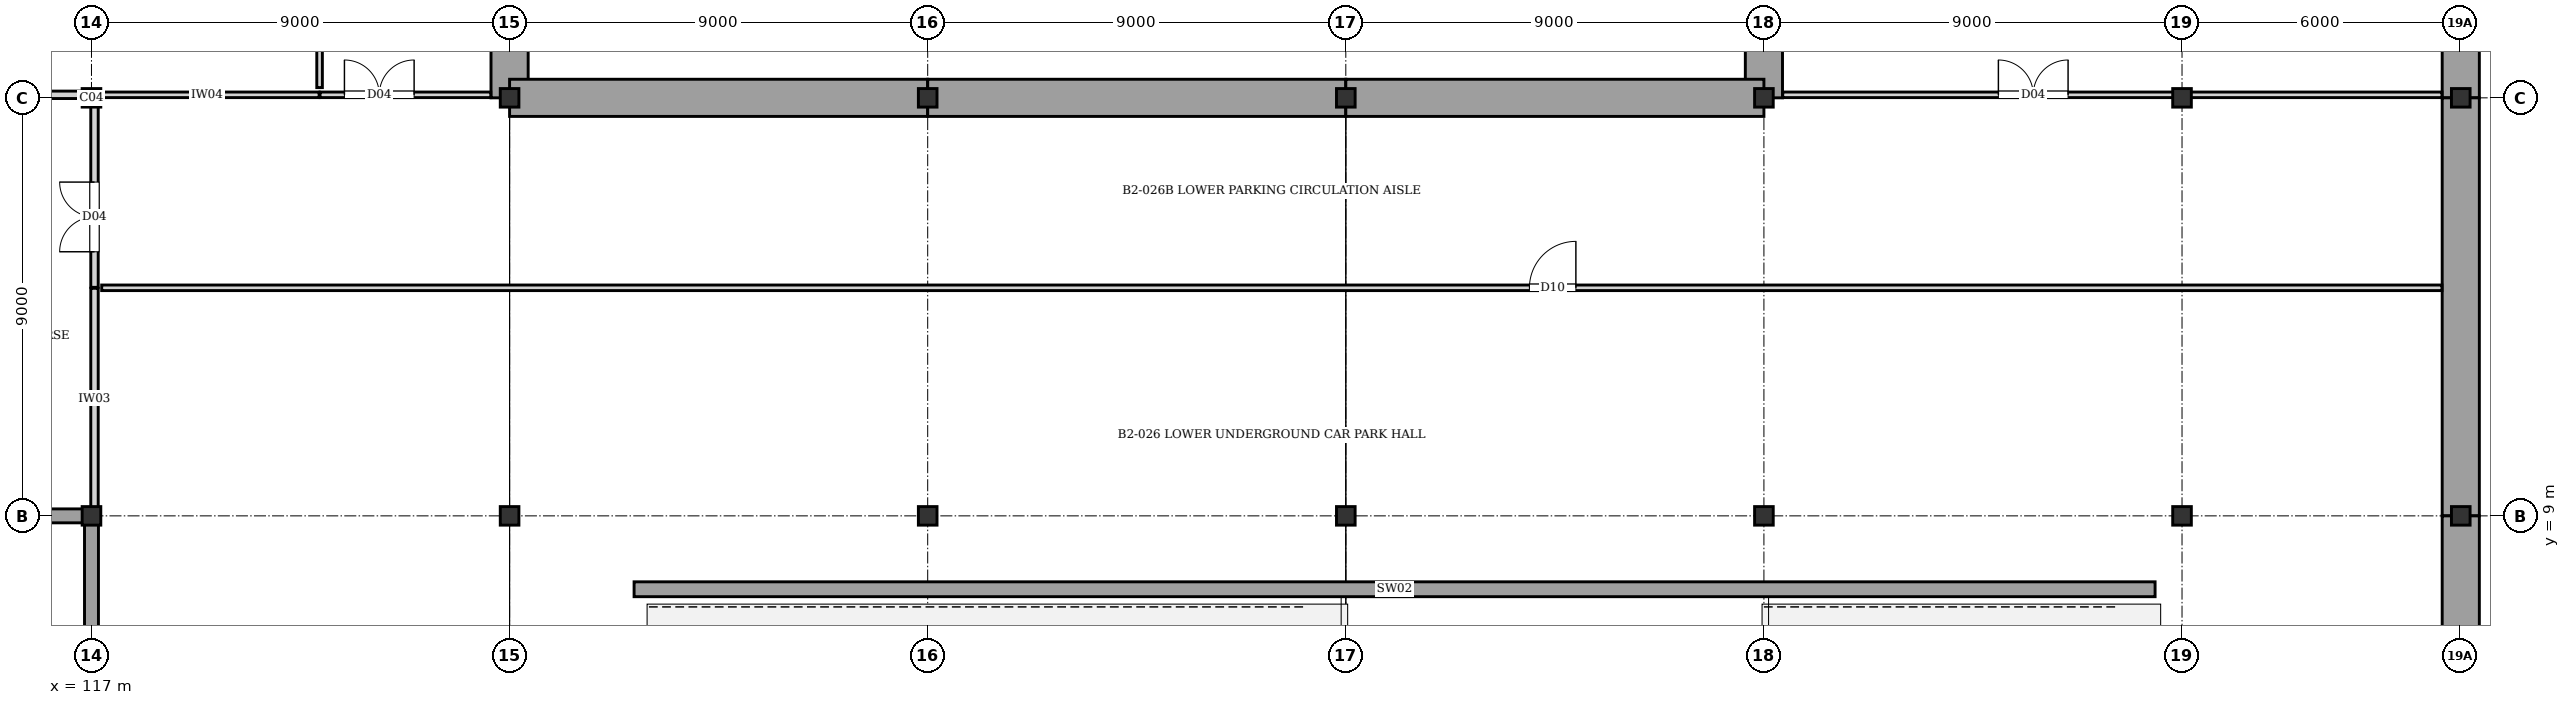
"""IFC4 building model, lengths in metres.
Left out: names, types, materials, properties, quantities, classifications, styles, units other than length and angle.
Written with IfcOpenShell. Run it as: python <this file> out.ifc"""

import sys

from ifc_helpers import new_model, si_unit, direction, frame, frame_2d, origin, origin_2d, place, context, subcontext, project, spatial, rectangle, i_section, extrude, element, fill, save


model = new_model("IFC4")
c1 = context("Model", 3, precision=1e-05, world=origin(), true_north=direction((0.0, 1.0)))
c2 = subcontext(c1, "Body", "Model", "MODEL_VIEW")
j1 = project(units=[si_unit("LENGTHUNIT", "METRE"), si_unit("PLANEANGLEUNIT", "RADIAN")], contexts=[c1])
p1 = place(None, origin())
s1 = spatial("IfcSite", under=j1, at=p1, CompositionType="ELEMENT")
p2 = place(p1, origin())
s2 = spatial("IfcBuilding", under=s1, at=p2, CompositionType="ELEMENT")
p3 = place(p2, frame((0.0, 0.0, -8.96)))
s3 = spatial("IfcBuildingStorey", under=s2, at=p3, CompositionType="ELEMENT", Elevation=-8.96)
for number, where, z_axis, x_axis in (
    (1, (117.0, 9.0, 0.0), (0.0, 0.0, 1.0), (1.0, 0.0, 0.0)),
    (2, (117.0, 18.0, 0.0), (0.0, 0.0, 1.0), (1.0, 0.0, 0.0)),
    (3, (126.0, 9.0, 0.0), (0.0, 0.0, 1.0), (1.0, 0.0, 0.0)),
    (4, (126.0, 18.0, 0.0), (0.0, 0.0, 1.0), (1.0, 0.0, 0.0)),
    (5, (135.0, 9.0, 0.0), (0.0, 0.0, 1.0), (1.0, 0.0, 0.0)),
    (6, (135.0, 18.0, 0.0), (0.0, 0.0, 1.0), (1.0, 0.0, 0.0)),
    (7, (144.0, 9.0, 0.0), (0.0, 0.0, 1.0), (1.0, 0.0, 0.0)),
    (8, (144.0, 18.0, 0.0), (0.0, 0.0, 1.0), (1.0, 0.0, 0.0)),
    (9, (153.0, 9.0, 0.0), (0.0, 0.0, 1.0), (1.0, 0.0, 0.0)),
    (10, (153.0, 18.0, 0.0), (0.0, 0.0, 1.0), (1.0, 0.0, 0.0)),
    (11, (162.0, 9.0, 0.0), (0.0, 0.0, 1.0), (1.0, 0.0, 0.0)),
    (12, (162.0, 18.0, 0.0), (0.0, 0.0, 1.0), (1.0, 0.0, 0.0)),
    (13, (168.0, 9.0, 0.0), (0.0, 0.0, 1.0), (1.0, 0.0, 0.0)),
    (14, (168.0, 18.0, 0.0), (0.0, 0.0, 1.0), (1.0, 0.0, 0.0)),
):
    element("IfcColumn", number, at=place(p3, frame(where, z_axis=z_axis, x_axis=x_axis)), inside=s3, PredefinedType="COLUMN", context=c2, shape_type="SweptSolid", body=[
        extrude(i_section(OverallWidth=0.401, OverallDepth=0.399, WebThickness=0.019, FlangeThickness=0.03, at=origin_2d()), origin(), (0.0, 0.0, 1.0), 4.48),
    ])
for number, where, z_axis, x_axis in (
    (15, (168.0, 27.0, 0.0), (0.0, 0.0, 1.0), (0.0, -1.0, 0.0)),
    (16, (168.0, 18.0, 0.0), (0.0, 0.0, 1.0), (0.0, -1.0, 0.0)),
    (17, (168.0, 9.0, 0.0), (0.0, 0.0, 1.0), (0.0, -1.0, 0.0)),
    (18, (153.0, 18.0, 0.0), (0.0, 0.0, 1.0), (0.0, 1.0, 0.0)),
    (19, (126.0, 27.0, 0.0), (0.0, 0.0, 1.0), (0.0, -1.0, 0.0)),
    (20, (126.0, 18.0, 0.0), (0.0, 0.0, 1.0), (1.0, 0.0, 0.0)),
    (21, (135.0, 18.0, 0.0), (0.0, 0.0, 1.0), (1.0, 0.0, 0.0)),
    (22, (144.0, 18.0, 0.0), (0.0, 0.0, 1.0), (1.0, 0.0, 0.0)),
):
    element("IfcWall", number, at=place(p3, frame(where, z_axis=z_axis, x_axis=x_axis)), inside=s3, PredefinedType="USERDEFINED", context=c2, shape_type="SweptSolid", body=[
        extrude(rectangle(XDim=9.0, YDim=0.8, at=frame_2d((4.5, 0.0))), origin(), (0.0, 0.0, 1.0), 4.08),
    ])
p4 = place(p3, frame((117.0, 0.0, 0.0), z_axis=(0.0, 0.0, 1.0), x_axis=(0.0, 1.0, 0.0)))
e23 = element("IfcWall", 23, at=p4, inside=s3, PredefinedType="SHEAR", context=c2, shape_type="SweptSolid", body=[
    extrude(rectangle(XDim=9.0, YDim=0.3, at=frame_2d((4.5, 0.0))), origin(), (0.0, 0.0, 1.0), 4.08),
])
p5 = place(p3, frame((108.0, 9.0, 0.0), z_axis=(0.0, 0.0, 1.0), x_axis=(1.0, 0.0, 0.0)))
e24 = element("IfcWall", 24, at=p5, inside=s3, PredefinedType="SHEAR", context=c2, shape_type="SweptSolid", body=[
    extrude(rectangle(XDim=9.0, YDim=0.3, at=frame_2d((4.5, 0.0))), origin(), (0.0, 0.0, 1.0), 4.08),
])
p6 = place(p5, frame((6.05, 0.0, 0.0)))
e25 = element("IfcOpeningElement", 25, at=p6, cuts=e24, PredefinedType="OPENING", context=c2, shape_type="SweptSolid", body=[
    extrude(rectangle(XDim=1.4, YDim=2.02, at=frame_2d((0.7, 1.01))), frame((0.0, 0.16, 0.0), z_axis=(0.0, -1.0, 0.0), x_axis=(1.0, 0.0, 0.0)), (0.0, 0.0, 1.0), 0.32),
])
p7 = place(p3, frame((128.68, 7.42, 0.0), z_axis=(0.0, 0.0, 1.0), x_axis=(1.0, 0.0, 0.0)))
e26 = element("IfcWall", 26, at=p7, inside=s3, PredefinedType="SHEAR", context=c2, shape_type="SweptSolid", body=[
    extrude(rectangle(XDim=32.74, YDim=0.32, at=frame_2d((16.37, 0.0))), origin(), (0.0, 0.0, 1.0), 4.08),
])
p8 = place(p3, frame((117.065, 9.155, 0.0), z_axis=(0.0, 0.0, 1.0), x_axis=(0.0, 1.0, 0.0)))
e27 = element("IfcWall", 27, at=p8, inside=s3, PredefinedType="PARTITIONING", context=c2, shape_type="SweptSolid", body=[
    extrude(rectangle(XDim=4.745, YDim=0.16, at=frame_2d((2.373, 0.0))), origin(), (0.0, 0.0, 1.0), 3.18),
])
p9 = place(p3, frame((108.405, 18.065, 0.0), z_axis=(0.0, 0.0, 1.0), x_axis=(1.0, 0.0, 0.0)))
e28 = element("IfcWall", 28, at=p9, inside=s3, PredefinedType="PARTITIONING", context=c2, shape_type="SweptSolid", body=[
    extrude(rectangle(XDim=8.655, YDim=0.16, at=frame_2d((4.328, 0.0))), origin(), (0.0, 0.0, 1.0), 3.18),
])
p10 = place(p3, frame((117.07, 18.065, 0.0), z_axis=(0.0, 0.0, 1.0), x_axis=(1.0, 0.0, 0.0)))
e29 = element("IfcWall", 29, at=p10, inside=s3, PredefinedType="PARTITIONING", context=c2, shape_type="SweptSolid", body=[
    extrude(rectangle(XDim=4.83, YDim=0.12, at=frame_2d((2.415, 0.0))), origin(), (0.0, 0.0, 1.0), 3.18),
])
p11 = place(p3, frame((117.065, 13.92, 0.0), z_axis=(0.0, 0.0, 1.0), x_axis=(0.0, 1.0, 0.0)))
e30 = element("IfcWall", 30, at=p11, inside=s3, PredefinedType="PARTITIONING", context=c2, shape_type="SweptSolid", body=[
    extrude(rectangle(XDim=3.99, YDim=0.16, at=frame_2d((1.995, 0.0))), origin(), (0.0, 0.0, 1.0), 3.18),
])
p12 = place(p11, frame((0.766, 0.0, 0.0)))
e31 = element("IfcOpeningElement", 31, at=p12, cuts=e30, PredefinedType="OPENING", context=c2, shape_type="SweptSolid", body=[
    extrude(rectangle(XDim=1.5, YDim=2.1, at=frame_2d((0.75, 1.05))), frame((0.0, 0.09, 0.0), z_axis=(0.0, -1.0, 0.0), x_axis=(1.0, 0.0, 0.0)), (0.0, 0.0, 1.0), 0.18),
])
p13 = place(p3, frame((117.22, 13.91, 0.0), z_axis=(0.0, 0.0, 1.0), x_axis=(1.0, 0.0, 0.0)))
e32 = element("IfcWall", 32, at=p13, inside=s3, PredefinedType="PARTITIONING", context=c2, shape_type="SweptSolid", body=[
    extrude(rectangle(XDim=50.375, YDim=0.12, at=frame_2d((25.188, 0.0))), origin(), (0.0, 0.0, 1.0), 4.08),
])
p14 = place(p13, frame((30.732, 0.0, 0.0)))
e33 = element("IfcOpeningElement", 33, at=p14, cuts=e32, PredefinedType="OPENING", context=c2, shape_type="SweptSolid", body=[
    extrude(rectangle(XDim=1.0, YDim=2.1, at=frame_2d((0.5, 1.05))), frame((0.0, 0.07, 0.0), z_axis=(0.0, -1.0, 0.0), x_axis=(1.0, 0.0, 0.0)), (0.0, 0.0, 1.0), 0.14),
])
p15 = place(p3, frame((121.92, 18.065, 0.0), z_axis=(0.0, 0.0, 1.0), x_axis=(1.0, 0.0, 0.0)))
e34 = element("IfcWall", 34, at=p15, inside=s3, PredefinedType="PARTITIONING", context=c2, shape_type="SweptSolid", body=[
    extrude(rectangle(XDim=3.675, YDim=0.12, at=frame_2d((1.837, 0.0))), origin(), (0.0, 0.0, 1.0), 3.18),
])
p16 = place(p15, frame((0.525, 0.0, 0.0)))
e35 = element("IfcOpeningElement", 35, at=p16, cuts=e34, PredefinedType="OPENING", context=c2, shape_type="SweptSolid", body=[
    extrude(rectangle(XDim=1.5, YDim=2.1, at=frame_2d((0.75, 1.05))), frame((0.0, 0.07, 0.0), z_axis=(0.0, -1.0, 0.0), x_axis=(1.0, 0.0, 0.0)), (0.0, 0.0, 1.0), 0.14),
])
p17 = place(p3, frame((153.405, 18.065, 0.0), z_axis=(0.0, 0.0, 1.0), x_axis=(1.0, 0.0, 0.0)))
e36 = element("IfcWall", 36, at=p17, inside=s3, PredefinedType="PARTITIONING", context=c2, shape_type="SweptSolid", body=[
    extrude(rectangle(XDim=8.615, YDim=0.12, at=frame_2d((4.308, 0.0))), origin(), (0.0, 0.0, 1.0), 3.18),
])
p18 = place(p17, frame((4.642, 0.0, 0.0)))
e37 = element("IfcOpeningElement", 37, at=p18, cuts=e36, PredefinedType="OPENING", context=c2, shape_type="SweptSolid", body=[
    extrude(rectangle(XDim=1.5, YDim=2.1, at=frame_2d((0.75, 1.05))), frame((0.0, 0.07, 0.0), z_axis=(0.0, -1.0, 0.0), x_axis=(1.0, 0.0, 0.0)), (0.0, 0.0, 1.0), 0.14),
])
p19 = place(p3, frame((121.91, 18.22, 0.0), z_axis=(0.0, 0.0, 1.0), x_axis=(0.0, 1.0, 0.0)))
e38 = element("IfcWall", 38, at=p19, inside=s3, PredefinedType="PARTITIONING", context=c2, shape_type="SweptSolid", body=[
    extrude(rectangle(XDim=26.51, YDim=0.12, at=frame_2d((13.255, 0.0))), origin(), (0.0, 0.0, 1.0), 4.08),
])
p20 = place(p19, frame((12.755, 0.0, 0.0)))
e39 = element("IfcOpeningElement", 39, at=p20, cuts=e38, PredefinedType="OPENING", context=c2, shape_type="SweptSolid", body=[
    extrude(rectangle(XDim=1.0, YDim=2.1, at=frame_2d((0.5, 1.05))), frame((0.0, 0.07, 0.0), z_axis=(0.0, -1.0, 0.0), x_axis=(1.0, 0.0, 0.0)), (0.0, 0.0, 1.0), 0.14),
])
p21 = place(p3, frame((162.02, 18.065, 0.0), z_axis=(0.0, 0.0, 1.0), x_axis=(1.0, 0.0, 0.0)))
e40 = element("IfcWall", 40, at=p21, inside=s3, PredefinedType="PARTITIONING", context=c2, shape_type="SweptSolid", body=[
    extrude(rectangle(XDim=5.575, YDim=0.12, at=frame_2d((2.788, 0.0))), origin(), (0.0, 0.0, 1.0), 3.38),
])
p22 = place(p12, origin())
e41 = element("IfcDoor", 41, at=p22, inside=s3, OperationType="DOUBLE_DOOR_SINGLE_SWING", PredefinedType="DOOR", context=c2, shape_type="SweptSolid", body=[
    extrude(rectangle(XDim=1.5, YDim=2.1, at=frame_2d((0.75, 1.05))), frame((0.0, 0.025, 0.0), z_axis=(0.0, -1.0, 0.0), x_axis=(1.0, 0.0, 0.0)), (0.0, 0.0, 1.0), 0.05),
])
fill(e31, e41)
p23 = place(p14, origin())
e42 = element("IfcDoor", 42, at=p23, inside=s3, OperationType="SINGLE_SWING_RIGHT", PredefinedType="DOOR", context=c2, shape_type="SweptSolid", body=[
    extrude(rectangle(XDim=1.0, YDim=2.1, at=frame_2d((0.5, 1.05))), frame((0.0, 0.025, 0.0), z_axis=(0.0, -1.0, 0.0), x_axis=(1.0, 0.0, 0.0)), (0.0, 0.0, 1.0), 0.05),
])
fill(e33, e42)
p24 = place(p16, origin())
e43 = element("IfcDoor", 43, at=p24, inside=s3, OperationType="DOUBLE_DOOR_SINGLE_SWING", PredefinedType="DOOR", context=c2, shape_type="SweptSolid", body=[
    extrude(rectangle(XDim=1.5, YDim=2.1, at=frame_2d((0.75, 1.05))), frame((0.0, 0.025, 0.0), z_axis=(0.0, -1.0, 0.0), x_axis=(1.0, 0.0, 0.0)), (0.0, 0.0, 1.0), 0.05),
])
fill(e35, e43)
p25 = place(p18, origin())
e44 = element("IfcDoor", 44, at=p25, inside=s3, OperationType="DOUBLE_DOOR_SINGLE_SWING", PredefinedType="DOOR", context=c2, shape_type="SweptSolid", body=[
    extrude(rectangle(XDim=1.5, YDim=2.1, at=frame_2d((0.75, 1.05))), frame((0.0, 0.025, 0.0), z_axis=(0.0, -1.0, 0.0), x_axis=(1.0, 0.0, 0.0)), (0.0, 0.0, 1.0), 0.05),
])
fill(e37, e44)
save(model, sys.argv[1])
